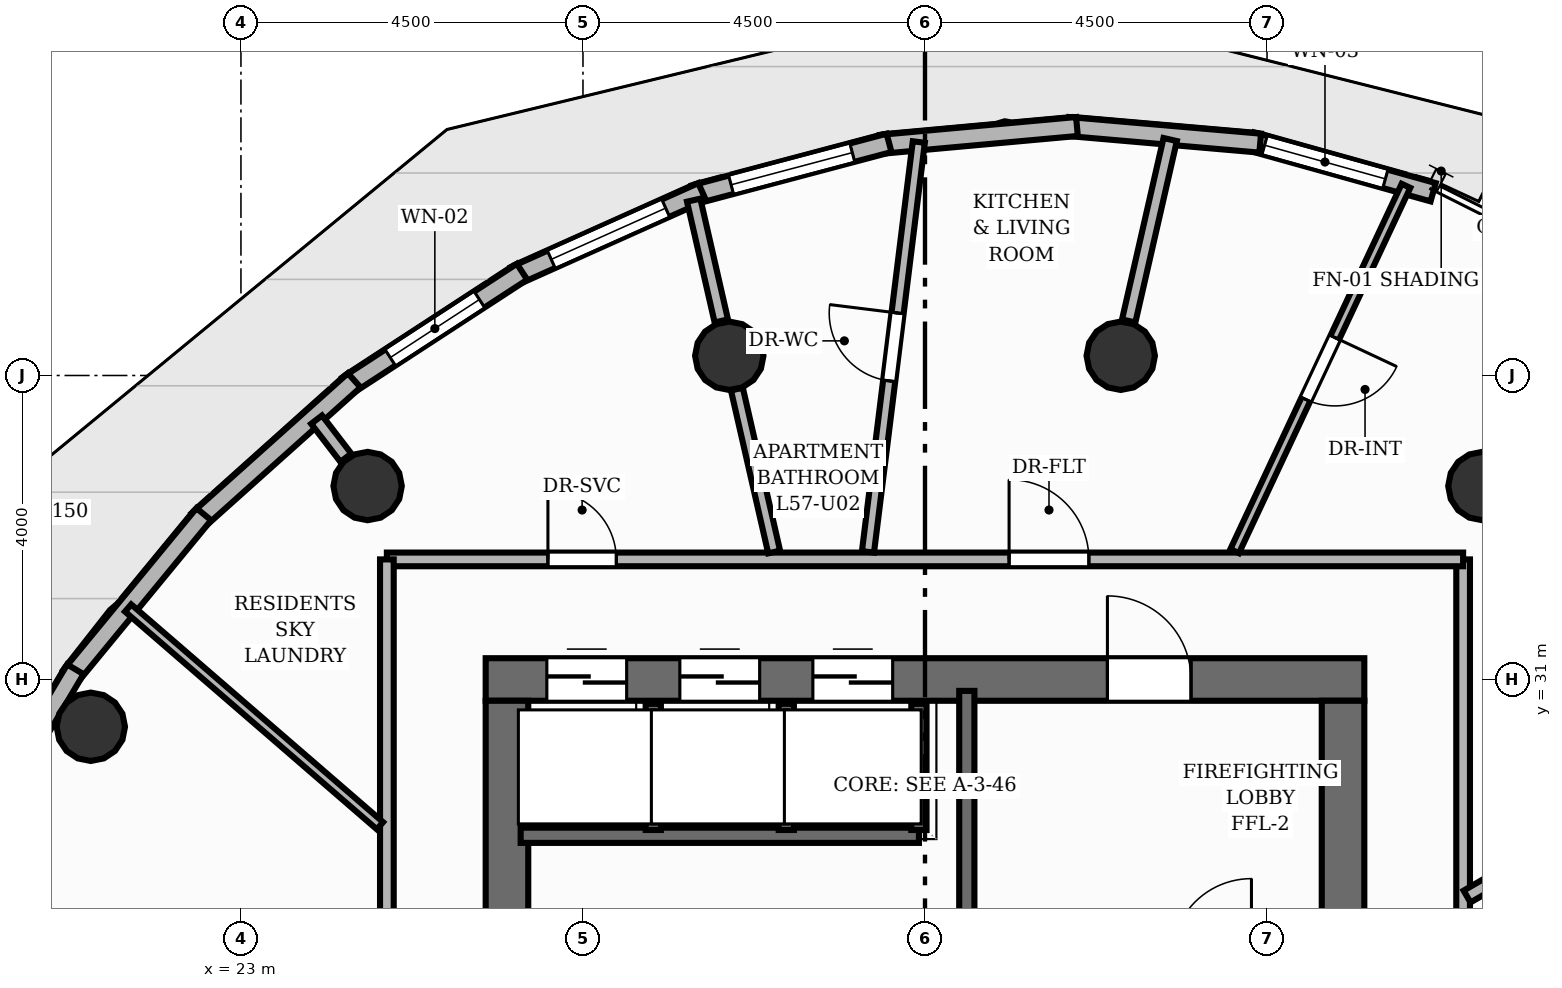
"""IFC4 building model, lengths in metres.
Left out: names, types, materials, properties, quantities, classifications, styles, units other than length and angle.
Written with IfcOpenShell. Run it as: python <this file> out.ifc"""

import sys

from ifc_helpers import new_model, si_unit, direction, frame, frame_2d, origin, origin_2d, place, context, subcontext, project, spatial, rectangle, circle, extrude, element, fill, save


model = new_model("IFC4")
c1 = context("Model", 3, precision=1e-05, world=origin(), true_north=direction((0.0, 1.0)))
c2 = subcontext(c1, "Body", "Model", "MODEL_VIEW")
j1 = project(units=[si_unit("LENGTHUNIT", "METRE"), si_unit("PLANEANGLEUNIT", "RADIAN")], contexts=[c1])
p1 = place(None, origin())
s1 = spatial("IfcSite", under=j1, at=p1, CompositionType="ELEMENT")
p2 = place(p1, origin())
s2 = spatial("IfcBuilding", under=s1, at=p2, CompositionType="ELEMENT")
p3 = place(p2, frame((0.0, 0.0, 191.84)))
s3 = spatial("IfcBuildingStorey", under=s2, at=p3, CompositionType="ELEMENT", Elevation=191.84)
p4 = place(p3, frame((26.22, 31.0, 0.0), z_axis=(0.0, 0.0, 1.0), x_axis=(1.0, 0.0, 0.0)))
e1 = element("IfcWall", 1, at=p4, inside=s3, PredefinedType="SHEAR", context=c2, shape_type="SweptSolid", body=[
    extrude(rectangle(XDim=11.56, YDim=0.56, at=frame_2d((5.78, 0.0))), origin(), (0.0, 0.0, 1.0), 3.2),
])
p5 = place(p4, frame((8.18, 0.0, 0.0)))
e2 = element("IfcOpeningElement", 2, at=p5, cuts=e1, PredefinedType="OPENING", context=c2, shape_type="SweptSolid", body=[
    extrude(rectangle(XDim=1.1, YDim=2.15, at=frame_2d((0.55, 1.075))), frame((0.0, 0.29, 0.0), z_axis=(0.0, -1.0, 0.0), x_axis=(1.0, 0.0, 0.0)), (0.0, 0.0, 1.0), 0.58),
])
p6 = place(p4, frame((0.805, 0.0, 0.0)))
e3 = element("IfcOpeningElement", 3, at=p6, cuts=e1, PredefinedType="OPENING", context=c2, shape_type="SweptSolid", body=[
    extrude(rectangle(XDim=1.05, YDim=2.15, at=frame_2d((0.525, 1.075))), frame((0.0, 0.29, 0.0), z_axis=(0.0, -1.0, 0.0), x_axis=(1.0, 0.0, 0.0)), (0.0, 0.0, 1.0), 0.58),
])
p7 = place(p4, frame((2.555, 0.0, 0.0)))
e4 = element("IfcOpeningElement", 4, at=p7, cuts=e1, PredefinedType="OPENING", context=c2, shape_type="SweptSolid", body=[
    extrude(rectangle(XDim=1.05, YDim=2.15, at=frame_2d((0.525, 1.075))), frame((0.0, 0.29, 0.0), z_axis=(0.0, -1.0, 0.0), x_axis=(1.0, 0.0, 0.0)), (0.0, 0.0, 1.0), 0.58),
])
p8 = place(p4, frame((4.305, 0.0, 0.0)))
e5 = element("IfcOpeningElement", 5, at=p8, cuts=e1, PredefinedType="OPENING", context=c2, shape_type="SweptSolid", body=[
    extrude(rectangle(XDim=1.05, YDim=2.15, at=frame_2d((0.525, 1.075))), frame((0.0, 0.29, 0.0), z_axis=(0.0, -1.0, 0.0), x_axis=(1.0, 0.0, 0.0)), (0.0, 0.0, 1.0), 0.58),
])
for number, where, z_axis, x_axis in (
    (6, (26.5, 17.28, 0.0), (0.0, 0.0, 1.0), (0.0, 1.0, 0.0)),
    (7, (37.5, 17.28, 0.0), (0.0, 0.0, 1.0), (0.0, 1.0, 0.0)),
):
    element("IfcWall", number, at=place(p3, frame(where, z_axis=z_axis, x_axis=x_axis)), inside=s3, PredefinedType="SHEAR", context=c2, shape_type="SweptSolid", body=[
        extrude(rectangle(XDim=13.44, YDim=0.56, at=frame_2d((6.72, 0.0))), origin(), (0.0, 0.0, 1.0), 3.2),
    ])
for number, where, z_axis, x_axis in (
    (8, (39.333, 33.545, 0.0), (0.0, 0.0, 1.0), (1.0, 0.0, 0.0)),
    (9, (34.575, 35.26, 0.0), (0.0, 0.0, 1.0), (1.0, 0.0, 0.0)),
    (10, (29.425, 35.26, 0.0), (0.0, 0.0, 1.0), (1.0, 0.0, 0.0)),
    (11, (24.667, 33.545, 0.0), (0.0, 0.0, 1.0), (1.0, 0.0, 0.0)),
    (12, (21.025, 30.378, 0.0), (0.0, 0.0, 1.0), (1.0, 0.0, 0.0)),
):
    element("IfcColumn", number, at=place(p3, frame(where, z_axis=z_axis, x_axis=x_axis)), inside=s3, PredefinedType="COLUMN", context=c2, shape_type="SweptSolid", body=[
        extrude(circle(Radius=0.45, at=origin_2d()), origin(), (0.0, 0.0, 1.0), 3.2),
    ])
p9 = place(p3, frame((36.299, 38.077, 0.0), z_axis=(0.0, 0.0, 1.0), x_axis=(0.96316841201, -0.26889888454, 0.0)))
e13 = element("IfcWall", 13, at=p9, inside=s3, PredefinedType="SOLIDWALL", context=c2, shape_type="SweptSolid", body=[
    extrude(rectangle(XDim=2.478, YDim=0.25, at=frame_2d((1.239, 0.0))), origin(), (0.0, 0.0, 1.0), 2.96),
])
p10 = place(p9, frame((0.175, 0.0, 0.85)))
e14 = element("IfcOpeningElement", 14, at=p10, cuts=e13, PredefinedType="OPENING", context=c2, shape_type="SweptSolid", body=[
    extrude(rectangle(XDim=1.65, YDim=1.55, at=frame_2d((0.825, 0.775))), frame((0.0, 0.135, 0.0), z_axis=(0.0, -1.0, 0.0), x_axis=(1.0, 0.0, 0.0)), (0.0, 0.0, 1.0), 0.27),
])
p11 = place(p3, frame((33.888, 38.276, 0.0), z_axis=(0.0, 0.0, 1.0), x_axis=(0.996260822813, -0.08639660252, 0.0)))
e15 = element("IfcWall", 15, at=p11, inside=s3, PredefinedType="SOLIDWALL", context=c2, shape_type="SweptSolid", body=[
    extrude(rectangle(XDim=2.532, YDim=0.25, at=frame_2d((1.266, 0.0))), origin(), (0.0, 0.0, 1.0), 2.96),
])
p12 = place(p3, frame((31.418, 38.042, 0.0), z_axis=(0.0, 0.0, 1.0), x_axis=(0.995895522128, 0.090510270169, 0.0)))
e16 = element("IfcWall", 16, at=p12, inside=s3, PredefinedType="SOLIDWALL", context=c2, shape_type="SweptSolid", body=[
    extrude(rectangle(XDim=2.592, YDim=0.25, at=frame_2d((1.296, 0.0))), origin(), (0.0, 0.0, 1.0), 2.96),
])
p13 = place(p3, frame((28.965, 37.381, 0.0), z_axis=(0.0, 0.0, 1.0), x_axis=(0.96652474621, 0.256573410476, 0.0)))
e17 = element("IfcWall", 17, at=p13, inside=s3, PredefinedType="SOLIDWALL", context=c2, shape_type="SweptSolid", body=[
    extrude(rectangle(XDim=2.651, YDim=0.25, at=frame_2d((1.325, 0.0))), origin(), (0.0, 0.0, 1.0), 2.96),
])
p14 = place(p13, frame((0.501, 0.0, 0.85)))
e18 = element("IfcOpeningElement", 18, at=p14, cuts=e17, PredefinedType="OPENING", context=c2, shape_type="SweptSolid", body=[
    extrude(rectangle(XDim=1.65, YDim=1.55, at=frame_2d((0.825, 0.775))), frame((0.0, 0.135, 0.0), z_axis=(0.0, -1.0, 0.0), x_axis=(1.0, 0.0, 0.0)), (0.0, 0.0, 1.0), 0.27),
])
p15 = place(p3, frame((26.603, 36.313, 0.0), z_axis=(0.0, 0.0, 1.0), x_axis=(0.912615139532, 0.408819773368, 0.0)))
e19 = element("IfcWall", 19, at=p15, inside=s3, PredefinedType="SOLIDWALL", context=c2, shape_type="SweptSolid", body=[
    extrude(rectangle(XDim=2.702, YDim=0.25, at=frame_2d((1.351, 0.0))), origin(), (0.0, 0.0, 1.0), 2.96),
])
p16 = place(p15, frame((0.526, 0.0, 0.85)))
e20 = element("IfcOpeningElement", 20, at=p16, cuts=e19, PredefinedType="OPENING", context=c2, shape_type="SweptSolid", body=[
    extrude(rectangle(XDim=1.65, YDim=1.55, at=frame_2d((0.825, 0.775))), frame((0.0, 0.135, 0.0), z_axis=(0.0, -1.0, 0.0), x_axis=(1.0, 0.0, 0.0)), (0.0, 0.0, 1.0), 0.27),
])
p17 = place(p3, frame((24.404, 34.87, 0.0), z_axis=(0.0, 0.0, 1.0), x_axis=(0.837860586987, 0.545884270496, 0.0)))
e21 = element("IfcWall", 21, at=p17, inside=s3, PredefinedType="SOLIDWALL", context=c2, shape_type="SweptSolid", body=[
    extrude(rectangle(XDim=2.739, YDim=0.25, at=frame_2d((1.369, 0.0))), origin(), (0.0, 0.0, 1.0), 2.96),
])
p18 = place(p17, frame((0.669, 0.0, 0.85)))
e22 = element("IfcOpeningElement", 22, at=p18, cuts=e21, PredefinedType="OPENING", context=c2, shape_type="SweptSolid", body=[
    extrude(rectangle(XDim=1.4, YDim=1.55, at=frame_2d((0.7, 0.775))), frame((0.0, 0.135, 0.0), z_axis=(0.0, -1.0, 0.0), x_axis=(1.0, 0.0, 0.0)), (0.0, 0.0, 1.0), 0.27),
])
for number, where, z_axis, x_axis in (
    (23, (22.436, 33.096, 0.0), (0.0, 0.0, 1.0), (0.745, 0.667, 0.0)),
    (24, (20.759, 31.045, 0.0), (0.0, 0.0, 1.0), (0.635, 0.772, 0.0)),
):
    element("IfcWall", number, at=place(p3, frame(where, z_axis=z_axis, x_axis=x_axis)), inside=s3, PredefinedType="SOLIDWALL", context=c2, shape_type="SweptSolid", body=[
        extrude(rectangle(XDim=2.758, YDim=0.25, at=frame_2d((1.379, 0.0))), origin(), (0.0, 0.0, 1.0), 2.96),
    ])
p19 = place(p3, frame((19.424, 28.779, 0.0), z_axis=(0.0, 0.0, 1.0), x_axis=(0.510320389621, 0.859984360287, 0.0)))
e25 = element("IfcWall", 25, at=p19, inside=s3, PredefinedType="SOLIDWALL", context=c2, shape_type="SweptSolid", body=[
    extrude(rectangle(XDim=2.738, YDim=0.25, at=frame_2d((1.369, 0.0))), origin(), (0.0, 0.0, 1.0), 2.96),
])
p20 = place(p19, frame((0.175, 0.0, 0.85)))
e26 = element("IfcOpeningElement", 26, at=p20, cuts=e25, PredefinedType="OPENING", context=c2, shape_type="SweptSolid", body=[
    extrude(rectangle(XDim=1.4, YDim=1.55, at=frame_2d((0.7, 0.775))), frame((0.0, 0.135, 0.0), z_axis=(0.0, -1.0, 0.0), x_axis=(1.0, 0.0, 0.0)), (0.0, 0.0, 1.0), 0.27),
])
p21 = place(p3, frame((32.55, 27.35, 0.0), z_axis=(0.0, 0.0, 1.0), x_axis=(0.0, 1.0, 0.0)))
e27 = element("IfcWall", 27, at=p21, inside=s3, PredefinedType="SHEAR", context=c2, shape_type="SweptSolid", body=[
    extrude(rectangle(XDim=3.5, YDim=0.2, at=frame_2d((1.75, 0.0))), origin(), (0.0, 0.0, 1.0), 3.2),
])
p22 = place(p3, frame((26.68, 28.95, 0.0), z_axis=(0.0, 0.0, 1.0), x_axis=(1.0, 0.0, 0.0)))
e28 = element("IfcWall", 28, at=p22, inside=s3, PredefinedType="SHEAR", context=c2, shape_type="SweptSolid", body=[
    extrude(rectangle(XDim=5.24, YDim=0.2, at=frame_2d((2.62, 0.0))), origin(), (0.0, 0.0, 1.0), 3.2),
])
for number, where, z_axis, x_axis in (
    (29, (31.92, 29.02, 0.0), (0.0, 0.0, 1.0), (0.0, 1.0, 0.0)),
    (30, (28.425, 29.02, 0.0), (0.0, 0.0, 1.0), (0.0, 1.0, 0.0)),
    (31, (30.175, 29.02, 0.0), (0.0, 0.0, 1.0), (0.0, 1.0, 0.0)),
):
    element("IfcWall", number, at=place(p3, frame(where, z_axis=z_axis, x_axis=x_axis)), inside=s3, PredefinedType="SHEAR", context=c2, shape_type="SweptSolid", body=[
        extrude(rectangle(XDim=1.66, YDim=0.2, at=frame_2d((0.83, 0.0))), origin(), (0.0, 0.0, 1.0), 3.2),
    ])
p23 = place(p3, frame((34.68, 35.718, 0.0), z_axis=(0.0, 0.0, 1.0), x_axis=(0.222943921747, 0.974831271429, 0.0)))
e32 = element("IfcWall", 32, at=p23, inside=s3, PredefinedType="PARTITIONING", context=c2, shape_type="SweptSolid", body=[
    extrude(rectangle(XDim=2.448, YDim=0.18, at=frame_2d((1.224, 0.0))), origin(), (0.0, 0.0, 1.0), 2.403),
])
p24 = place(p3, frame((29.32, 35.718, 0.0), z_axis=(0.0, 0.0, 1.0), x_axis=(-0.222967107114, 0.974825968645, 0.0)))
e33 = element("IfcWall", 33, at=p24, inside=s3, PredefinedType="PARTITIONING", context=c2, shape_type="SweptSolid", body=[
    extrude(rectangle(XDim=1.63, YDim=0.18, at=frame_2d((0.815, 0.0))), origin(), (0.0, 0.0, 1.0), 2.403),
])
p25 = place(p3, frame((24.38, 33.918, 0.0), z_axis=(0.0, 0.0, 1.0), x_axis=(-0.609112888366, 0.793083532314, 0.0)))
e34 = element("IfcWall", 34, at=p25, inside=s3, PredefinedType="PARTITIONING", context=c2, shape_type="SweptSolid", body=[
    extrude(rectangle(XDim=0.632, YDim=0.18, at=frame_2d((0.316, 0.0))), origin(), (0.0, 0.0, 1.0), 2.403),
])
p26 = place(p3, frame((39.08, 32.58, 0.0), z_axis=(0.0, 0.0, 1.0), x_axis=(0.0, -1.0, 0.0)))
e35 = element("IfcWall", 35, at=p26, inside=s3, PredefinedType="PARTITIONING", context=c2, shape_type="SweptSolid", body=[
    extrude(rectangle(XDim=8.094, YDim=0.18, at=frame_2d((4.047, 0.0))), origin(), (0.0, 0.0, 1.0), 2.955),
])
p27 = place(p26, frame((5.174, 0.0, 0.0)))
e36 = element("IfcOpeningElement", 36, at=p27, cuts=e35, PredefinedType="OPENING", context=c2, shape_type="SweptSolid", body=[
    extrude(rectangle(XDim=0.9, YDim=2.1, at=frame_2d((0.45, 1.05))), frame((0.0, 0.1, 0.0), z_axis=(0.0, -1.0, 0.0), x_axis=(1.0, 0.0, 0.0)), (0.0, 0.0, 1.0), 0.2),
])
p28 = place(p3, frame((24.92, 32.58, 0.0), z_axis=(0.0, 0.0, 1.0), x_axis=(1.0, 0.0, 0.0)))
e37 = element("IfcWall", 37, at=p28, inside=s3, PredefinedType="PARTITIONING", context=c2, shape_type="SweptSolid", body=[
    extrude(rectangle(XDim=14.16, YDim=0.18, at=frame_2d((7.08, 0.0))), origin(), (0.0, 0.0, 1.0), 2.955),
])
p29 = place(p28, frame((8.186, 0.0, 0.0)))
e38 = element("IfcOpeningElement", 38, at=p29, cuts=e37, PredefinedType="OPENING", context=c2, shape_type="SweptSolid", body=[
    extrude(rectangle(XDim=1.05, YDim=2.15, at=frame_2d((0.525, 1.075))), frame((0.0, 0.1, 0.0), z_axis=(0.0, -1.0, 0.0), x_axis=(1.0, 0.0, 0.0)), (0.0, 0.0, 1.0), 0.2),
])
p30 = place(p28, frame((2.119, 0.0, 0.0)))
e39 = element("IfcOpeningElement", 39, at=p30, cuts=e37, PredefinedType="OPENING", context=c2, shape_type="SweptSolid", body=[
    extrude(rectangle(XDim=0.9, YDim=2.1, at=frame_2d((0.45, 1.05))), frame((0.0, 0.1, 0.0), z_axis=(0.0, -1.0, 0.0), x_axis=(1.0, 0.0, 0.0)), (0.0, 0.0, 1.0), 0.2),
])
p31 = place(p3, frame((24.92, 19.382, 0.0), z_axis=(0.0, 0.0, 1.0), x_axis=(0.0, 1.0, 0.0)))
e40 = element("IfcWall", 40, at=p31, inside=s3, PredefinedType="PARTITIONING", context=c2, shape_type="SweptSolid", body=[
    extrude(rectangle(XDim=13.198, YDim=0.18, at=frame_2d((6.599, 0.0))), origin(), (0.0, 0.0, 1.0), 2.955),
])
p32 = place(p31, frame((7.282, 0.0, 0.0)))
e41 = element("IfcOpeningElement", 41, at=p32, cuts=e40, PredefinedType="OPENING", context=c2, shape_type="SweptSolid", body=[
    extrude(rectangle(XDim=0.9, YDim=2.1, at=frame_2d((0.45, 1.05))), frame((0.0, 0.1, 0.0), z_axis=(0.0, -1.0, 0.0), x_axis=(1.0, 0.0, 0.0)), (0.0, 0.0, 1.0), 0.2),
])
p33 = place(p3, frame((39.132, 28.144, 0.0), z_axis=(0.0, 0.0, 1.0), x_axis=(0.864597268714, 0.502465484319, 0.0)))
e42 = element("IfcWall", 42, at=p33, inside=s3, PredefinedType="PARTITIONING", context=c2, shape_type="SweptSolid", body=[
    extrude(rectangle(XDim=3.998, YDim=0.18, at=frame_2d((1.999, 0.0))), origin(), (0.0, 0.0, 1.0), 2.403),
])
p34 = place(p3, frame((31.25, 32.679, 0.0), z_axis=(0.0, 0.0, 1.0), x_axis=(0.123100196343, 0.992394247091, 0.0)))
e43 = element("IfcWall", 43, at=p34, inside=s3, PredefinedType="PLUMBINGWALL", context=c2, shape_type="SweptSolid", body=[
    extrude(rectangle(XDim=5.434, YDim=0.16, at=frame_2d((2.717, 0.0))), origin(), (0.0, 0.0, 1.0), 2.692),
])
p35 = place(p34, frame((2.267, 0.0, 0.0)))
e44 = element("IfcOpeningElement", 44, at=p35, cuts=e43, PredefinedType="OPENING", context=c2, shape_type="SweptSolid", body=[
    extrude(rectangle(XDim=0.9, YDim=2.1, at=frame_2d((0.45, 1.05))), frame((0.0, 0.09, 0.0), z_axis=(0.0, -1.0, 0.0), x_axis=(1.0, 0.0, 0.0)), (0.0, 0.0, 1.0), 0.18),
])
p36 = place(p3, frame((38.328, 37.496, 0.0), z_axis=(0.0, 0.0, 1.0), x_axis=(-0.424538730781, -0.905409777983, 0.0)))
e45 = element("IfcWall", 45, at=p36, inside=s3, PredefinedType="PARTITIONING", context=c2, shape_type="SweptSolid", body=[
    extrude(rectangle(XDim=5.309, YDim=0.125, at=frame_2d((2.655, 0.0))), origin(), (0.0, 0.0, 1.0), 2.955),
])
p37 = place(p36, frame((2.205, 0.0, 0.0)))
e46 = element("IfcOpeningElement", 46, at=p37, cuts=e45, PredefinedType="OPENING", context=c2, shape_type="SweptSolid", body=[
    extrude(rectangle(XDim=0.9, YDim=2.1, at=frame_2d((0.45, 1.05))), frame((0.0, 0.073, 0.0), z_axis=(0.0, -1.0, 0.0), x_axis=(1.0, 0.0, 0.0)), (0.0, 0.0, 1.0), 0.145),
])
p38 = place(p3, frame((30.015, 32.677, 0.0), z_axis=(0.0, 0.0, 1.0), x_axis=(-0.222969522248, 0.974825416241, 0.0)))
e47 = element("IfcWall", 47, at=p38, inside=s3, PredefinedType="PLUMBINGWALL", context=c2, shape_type="SweptSolid", body=[
    extrude(rectangle(XDim=2.199, YDim=0.16, at=frame_2d((1.099, 0.0))), origin(), (0.0, 0.0, 1.0), 2.403),
])
p39 = place(p3, frame((21.515, 31.941, 0.0), z_axis=(0.0, 0.0, 1.0), x_axis=(0.756468247818, -0.654030419815, 0.0)))
e48 = element("IfcWall", 48, at=p39, inside=s3, PredefinedType="PARTITIONING", context=c2, shape_type="SweptSolid", body=[
    extrude(rectangle(XDim=4.381, YDim=0.125, at=frame_2d((2.19, 0.0))), origin(), (0.0, 0.0, 1.0), 2.692),
])
p40 = place(p10, origin())
e49 = element("IfcWindow", 49, at=p40, inside=s3, PartitioningType="SINGLE_PANEL", PredefinedType="WINDOW", context=c2, shape_type="SweptSolid", body=[
    extrude(rectangle(XDim=1.65, YDim=1.55, at=frame_2d((0.825, 0.775))), frame((0.0, 0.03, 0.0), z_axis=(0.0, -1.0, 0.0), x_axis=(1.0, 0.0, 0.0)), (0.0, 0.0, 1.0), 0.06),
])
fill(e14, e49)
p41 = place(p14, origin())
e50 = element("IfcWindow", 50, at=p41, inside=s3, PartitioningType="SINGLE_PANEL", PredefinedType="WINDOW", context=c2, shape_type="SweptSolid", body=[
    extrude(rectangle(XDim=1.65, YDim=1.55, at=frame_2d((0.825, 0.775))), frame((0.0, 0.03, 0.0), z_axis=(0.0, -1.0, 0.0), x_axis=(1.0, 0.0, 0.0)), (0.0, 0.0, 1.0), 0.06),
])
fill(e18, e50)
p42 = place(p16, origin())
e51 = element("IfcWindow", 51, at=p42, inside=s3, PartitioningType="SINGLE_PANEL", PredefinedType="WINDOW", context=c2, shape_type="SweptSolid", body=[
    extrude(rectangle(XDim=1.65, YDim=1.55, at=frame_2d((0.825, 0.775))), frame((0.0, 0.03, 0.0), z_axis=(0.0, -1.0, 0.0), x_axis=(1.0, 0.0, 0.0)), (0.0, 0.0, 1.0), 0.06),
])
fill(e20, e51)
p43 = place(p18, origin())
e52 = element("IfcWindow", 52, at=p43, inside=s3, PartitioningType="SINGLE_PANEL", PredefinedType="WINDOW", context=c2, shape_type="SweptSolid", body=[
    extrude(rectangle(XDim=1.4, YDim=1.55, at=frame_2d((0.7, 0.775))), frame((0.0, 0.03, 0.0), z_axis=(0.0, -1.0, 0.0), x_axis=(1.0, 0.0, 0.0)), (0.0, 0.0, 1.0), 0.06),
])
fill(e22, e52)
p44 = place(p5, origin())
e53 = element("IfcDoor", 53, at=p44, inside=s3, OperationType="SINGLE_SWING_LEFT", PredefinedType="DOOR", context=c2, shape_type="SweptSolid", body=[
    extrude(rectangle(XDim=1.1, YDim=2.15, at=frame_2d((0.55, 1.075))), frame((0.0, 0.025, 0.0), z_axis=(0.0, -1.0, 0.0), x_axis=(1.0, 0.0, 0.0)), (0.0, 0.0, 1.0), 0.05),
])
fill(e2, e53)
p45 = place(p6, origin())
e54 = element("IfcDoor", 54, at=p45, inside=s3, OperationType="DOUBLE_DOOR_SLIDING", PredefinedType="DOOR", context=c2, shape_type="SweptSolid", body=[
    extrude(rectangle(XDim=1.05, YDim=2.15, at=frame_2d((0.525, 1.075))), frame((0.0, 0.025, 0.0), z_axis=(0.0, -1.0, 0.0), x_axis=(1.0, 0.0, 0.0)), (0.0, 0.0, 1.0), 0.05),
])
fill(e3, e54)
p46 = place(p7, origin())
e55 = element("IfcDoor", 55, at=p46, inside=s3, OperationType="DOUBLE_DOOR_SLIDING", PredefinedType="DOOR", context=c2, shape_type="SweptSolid", body=[
    extrude(rectangle(XDim=1.05, YDim=2.15, at=frame_2d((0.525, 1.075))), frame((0.0, 0.025, 0.0), z_axis=(0.0, -1.0, 0.0), x_axis=(1.0, 0.0, 0.0)), (0.0, 0.0, 1.0), 0.05),
])
fill(e4, e55)
p47 = place(p8, origin())
e56 = element("IfcDoor", 56, at=p47, inside=s3, OperationType="DOUBLE_DOOR_SLIDING", PredefinedType="DOOR", context=c2, shape_type="SweptSolid", body=[
    extrude(rectangle(XDim=1.05, YDim=2.15, at=frame_2d((0.525, 1.075))), frame((0.0, 0.025, 0.0), z_axis=(0.0, -1.0, 0.0), x_axis=(1.0, 0.0, 0.0)), (0.0, 0.0, 1.0), 0.05),
])
fill(e5, e56)
p48 = place(p29, origin())
e57 = element("IfcDoor", 57, at=p48, inside=s3, OperationType="SINGLE_SWING_LEFT", PredefinedType="DOOR", context=c2, shape_type="SweptSolid", body=[
    extrude(rectangle(XDim=1.05, YDim=2.15, at=frame_2d((0.525, 1.075))), frame((0.0, 0.025, 0.0), z_axis=(0.0, -1.0, 0.0), x_axis=(1.0, 0.0, 0.0)), (0.0, 0.0, 1.0), 0.05),
])
fill(e38, e57)
p49 = place(p35, origin())
e58 = element("IfcDoor", 58, at=p49, inside=s3, OperationType="SINGLE_SWING_RIGHT", PredefinedType="DOOR", context=c2, shape_type="SweptSolid", body=[
    extrude(rectangle(XDim=0.9, YDim=2.1, at=frame_2d((0.45, 1.05))), frame((0.0, 0.025, 0.0), z_axis=(0.0, -1.0, 0.0), x_axis=(1.0, 0.0, 0.0)), (0.0, 0.0, 1.0), 0.05),
])
fill(e44, e58)
p50 = place(p37, origin())
e59 = element("IfcDoor", 59, at=p50, inside=s3, OperationType="SINGLE_SWING_LEFT", PredefinedType="DOOR", context=c2, shape_type="SweptSolid", body=[
    extrude(rectangle(XDim=0.9, YDim=2.1, at=frame_2d((0.45, 1.05))), frame((0.0, 0.025, 0.0), z_axis=(0.0, -1.0, 0.0), x_axis=(1.0, 0.0, 0.0)), (0.0, 0.0, 1.0), 0.05),
])
fill(e46, e59)
p51 = place(p30, origin())
e60 = element("IfcDoor", 60, at=p51, inside=s3, OperationType="SINGLE_SWING_LEFT", PredefinedType="DOOR", context=c2, shape_type="SweptSolid", body=[
    extrude(rectangle(XDim=0.9, YDim=2.1, at=frame_2d((0.45, 1.05))), frame((0.0, 0.025, 0.0), z_axis=(0.0, -1.0, 0.0), x_axis=(1.0, 0.0, 0.0)), (0.0, 0.0, 1.0), 0.05),
])
fill(e39, e60)
save(model, sys.argv[1])
